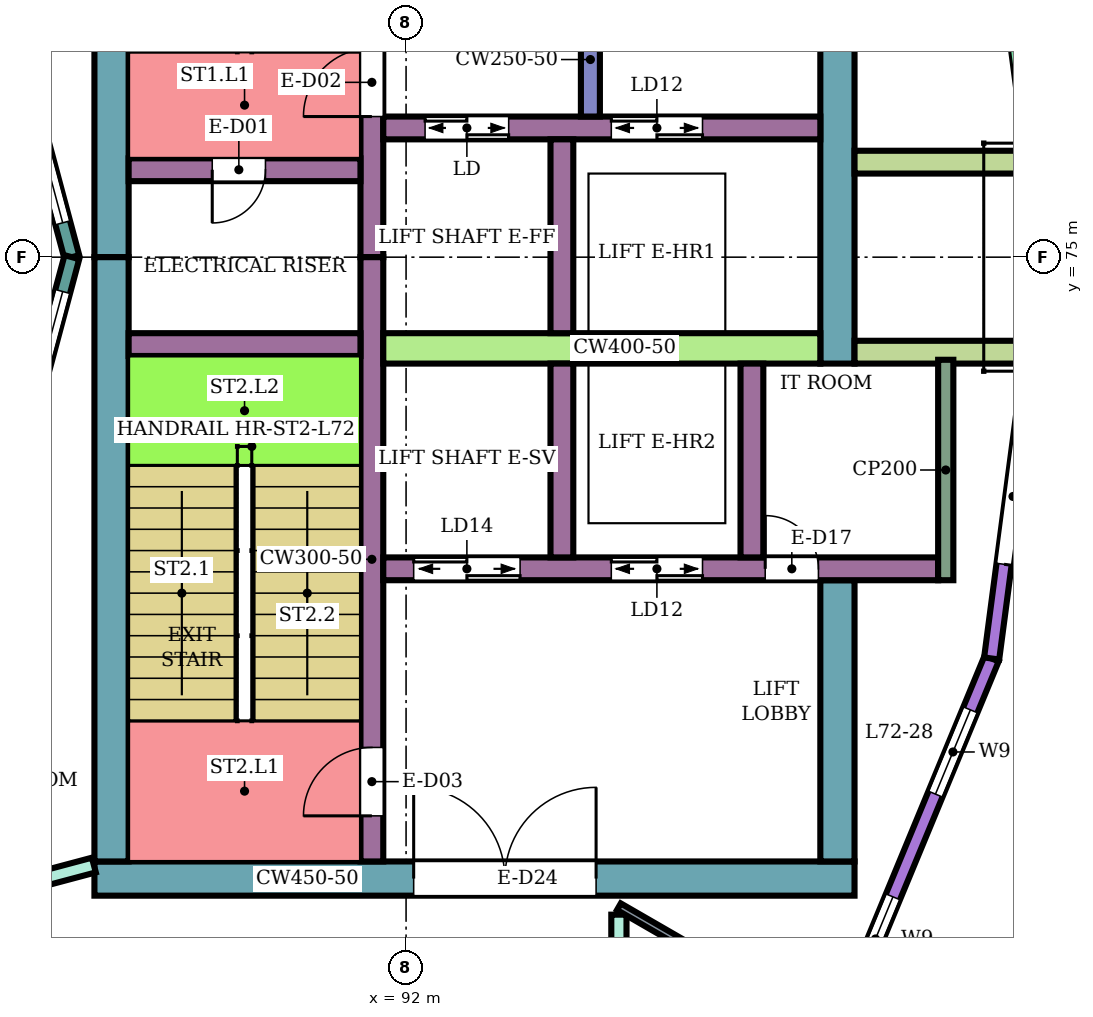
"""IFC4 building model, lengths in metres.
Left out: names, types, materials, properties, quantities, classifications, styles, units other than length and angle.
Written with IfcOpenShell. Run it as: python <this file> out.ifc"""

import sys

from ifc_helpers import new_model, si_unit, direction, frame, frame_2d, origin, place, context, subcontext, project, spatial, rectangle, extrude, element, fill, save


model = new_model("IFC4")
c1 = context("Model", 3, precision=1e-05, world=origin(), true_north=direction((0.0, 1.0)))
c2 = subcontext(c1, "Body", "Model", "MODEL_VIEW")
j1 = project(units=[si_unit("LENGTHUNIT", "METRE"), si_unit("PLANEANGLEUNIT", "RADIAN")], contexts=[c1])
p1 = place(None, origin())
s1 = spatial("IfcSite", under=j1, at=p1, CompositionType="ELEMENT")
p2 = place(p1, origin())
s2 = spatial("IfcBuilding", under=s1, at=p2, CompositionType="ELEMENT")
p3 = place(p2, frame((0.0, 0.0, 314.9)))
s3 = spatial("IfcBuildingStorey", under=s2, at=p3, CompositionType="ELEMENT", Elevation=314.9)
p4 = place(p3, frame((87.9, 66.825, 0.0), z_axis=(0.0, 0.0, 1.0), x_axis=(1.0, 0.0, 0.0)))
e1 = element("IfcWall", 1, at=p4, inside=s3, PredefinedType="SHEAR", context=c2, shape_type="SweptSolid", body=[
    extrude(rectangle(XDim=10.0, YDim=0.45, at=frame_2d((5.0, 0.0))), origin(), (0.0, 0.0, 1.0), 4.08),
])
p5 = place(p4, frame((4.2, 0.0, 0.0)))
e2 = element("IfcOpeningElement", 2, at=p5, cuts=e1, PredefinedType="OPENING", context=c2, shape_type="SweptSolid", body=[
    extrude(rectangle(XDim=2.4, YDim=2.4, at=frame_2d((1.2, 1.2))), frame((0.0, 0.235, 0.0), z_axis=(0.0, -1.0, 0.0), x_axis=(1.0, 0.0, 0.0)), (0.0, 0.0, 1.0), 0.47),
])
for number, where, z_axis, x_axis in (
    (3, (88.125, 75.0, 0.0), (0.0, 0.0, 1.0), (0.0, 1.0, 0.0)),
    (4, (88.125, 67.05, 0.0), (0.0, 0.0, 1.0), (0.0, 1.0, 0.0)),
):
    element("IfcWall", number, at=place(p3, frame(where, z_axis=z_axis, x_axis=x_axis)), inside=s3, PredefinedType="SHEAR", context=c2, shape_type="SweptSolid", body=[
        extrude(rectangle(XDim=7.95, YDim=0.45, at=frame_2d((3.975, 0.0))), origin(), (0.0, 0.0, 1.0), 4.08),
    ])
p6 = place(p3, frame((97.675, 73.6, 0.0), z_axis=(0.0, 0.0, 1.0), x_axis=(0.0, 1.0, 0.0)))
e5 = element("IfcWall", 5, at=p6, inside=s3, PredefinedType="SHEAR", context=c2, shape_type="SweptSolid", body=[
    extrude(rectangle(XDim=9.35, YDim=0.45, at=frame_2d((4.675, 0.0))), origin(), (0.0, 0.0, 1.0), 4.08),
])
p7 = place(p3, frame((97.675, 67.05, 0.0), z_axis=(0.0, 0.0, 1.0), x_axis=(0.0, 1.0, 0.0)))
e6 = element("IfcWall", 6, at=p7, inside=s3, PredefinedType="SHEAR", context=c2, shape_type="SweptSolid", body=[
    extrude(rectangle(XDim=3.7, YDim=0.45, at=frame_2d((1.85, 0.0))), origin(), (0.0, 0.0, 1.0), 4.08),
])
p8 = place(p3, frame((91.55, 75.0, 0.0), z_axis=(0.0, 0.0, 1.0), x_axis=(0.0, 1.0, 0.0)))
e7 = element("IfcWall", 7, at=p8, inside=s3, PredefinedType="SHEAR", context=c2, shape_type="SweptSolid", body=[
    extrude(rectangle(XDim=7.95, YDim=0.3, at=frame_2d((3.975, 0.0))), origin(), (0.0, 0.0, 1.0), 4.08),
])
p9 = place(p8, frame((1.85, 0.0, 0.0)))
e8 = element("IfcOpeningElement", 8, at=p9, cuts=e7, PredefinedType="OPENING", context=c2, shape_type="SweptSolid", body=[
    extrude(rectangle(XDim=0.9, YDim=2.1, at=frame_2d((0.45, 1.05))), frame((0.0, 0.16, 0.0), z_axis=(0.0, -1.0, 0.0), x_axis=(1.0, 0.0, 0.0)), (0.0, 0.0, 1.0), 0.32),
])
p10 = place(p3, frame((91.55, 67.05, 0.0), z_axis=(0.0, 0.0, 1.0), x_axis=(0.0, 1.0, 0.0)))
e9 = element("IfcWall", 9, at=p10, inside=s3, PredefinedType="SHEAR", context=c2, shape_type="SweptSolid", body=[
    extrude(rectangle(XDim=7.95, YDim=0.3, at=frame_2d((3.975, 0.0))), origin(), (0.0, 0.0, 1.0), 4.08),
])
p11 = place(p10, frame((0.6, 0.0, 0.0)))
e10 = element("IfcOpeningElement", 10, at=p11, cuts=e9, PredefinedType="OPENING", context=c2, shape_type="SweptSolid", body=[
    extrude(rectangle(XDim=0.9, YDim=2.1, at=frame_2d((0.45, 1.05))), frame((0.0, 0.16, 0.0), z_axis=(0.0, -1.0, 0.0), x_axis=(1.0, 0.0, 0.0)), (0.0, 0.0, 1.0), 0.32),
])
p12 = place(p3, frame((88.35, 76.15, 0.0), z_axis=(0.0, 0.0, 1.0), x_axis=(1.0, 0.0, 0.0)))
e11 = element("IfcWall", 11, at=p12, inside=s3, PredefinedType="SHEAR", context=c2, shape_type="SweptSolid", body=[
    extrude(rectangle(XDim=3.05, YDim=0.3, at=frame_2d((1.525, 0.0))), origin(), (0.0, 0.0, 1.0), 4.08),
])
p13 = place(p12, frame((1.1, 0.0, 0.0)))
e12 = element("IfcOpeningElement", 12, at=p13, cuts=e11, PredefinedType="OPENING", context=c2, shape_type="SweptSolid", body=[
    extrude(rectangle(XDim=0.7, YDim=2.0, at=frame_2d((0.35, 1.0))), frame((0.0, 0.16, 0.0), z_axis=(0.0, -1.0, 0.0), x_axis=(1.0, 0.0, 0.0)), (0.0, 0.0, 1.0), 0.32),
])
p14 = place(p3, frame((88.35, 73.85, 0.0), z_axis=(0.0, 0.0, 1.0), x_axis=(1.0, 0.0, 0.0)))
e13 = element("IfcWall", 13, at=p14, inside=s3, PredefinedType="SHEAR", context=c2, shape_type="SweptSolid", body=[
    extrude(rectangle(XDim=3.05, YDim=0.3, at=frame_2d((1.525, 0.0))), origin(), (0.0, 0.0, 1.0), 4.08),
])
p15 = place(p3, frame((91.7, 76.7, 0.0), z_axis=(0.0, 0.0, 1.0), x_axis=(1.0, 0.0, 0.0)))
e14 = element("IfcWall", 14, at=p15, inside=s3, PredefinedType="SHEAR", context=c2, shape_type="SweptSolid", body=[
    extrude(rectangle(XDim=5.75, YDim=0.3, at=frame_2d((2.875, 0.0))), origin(), (0.0, 0.0, 1.0), 4.08),
])
p16 = place(p15, frame((0.55, 0.0, 0.0)))
e15 = element("IfcOpeningElement", 15, at=p16, cuts=e14, PredefinedType="OPENING", context=c2, shape_type="SweptSolid", body=[
    extrude(rectangle(XDim=1.1, YDim=2.1, at=frame_2d((0.55, 1.05))), frame((0.0, 0.16, 0.0), z_axis=(0.0, -1.0, 0.0), x_axis=(1.0, 0.0, 0.0)), (0.0, 0.0, 1.0), 0.32),
])
p17 = place(p15, frame((3.0, 0.0, 0.0)))
e16 = element("IfcOpeningElement", 16, at=p17, cuts=e14, PredefinedType="OPENING", context=c2, shape_type="SweptSolid", body=[
    extrude(rectangle(XDim=1.2, YDim=2.1, at=frame_2d((0.6, 1.05))), frame((0.0, 0.16, 0.0), z_axis=(0.0, -1.0, 0.0), x_axis=(1.0, 0.0, 0.0)), (0.0, 0.0, 1.0), 0.32),
])
p18 = place(p3, frame((91.7, 73.8, 0.0), z_axis=(0.0, 0.0, 1.0), x_axis=(1.0, 0.0, 0.0)))
e17 = element("IfcWall", 17, at=p18, inside=s3, PredefinedType="SHEAR", context=c2, shape_type="SweptSolid", body=[
    extrude(rectangle(XDim=5.75, YDim=0.4, at=frame_2d((2.875, 0.0))), origin(), (0.0, 0.0, 1.0), 4.08),
])
p19 = place(p3, frame((91.7, 70.9, 0.0), z_axis=(0.0, 0.0, 1.0), x_axis=(1.0, 0.0, 0.0)))
e18 = element("IfcWall", 18, at=p19, inside=s3, PredefinedType="SHEAR", context=c2, shape_type="SweptSolid", body=[
    extrude(rectangle(XDim=7.3, YDim=0.3, at=frame_2d((3.65, 0.0))), origin(), (0.0, 0.0, 1.0), 4.08),
])
p20 = place(p19, frame((0.4, 0.0, 0.0)))
e19 = element("IfcOpeningElement", 19, at=p20, cuts=e18, PredefinedType="OPENING", context=c2, shape_type="SweptSolid", body=[
    extrude(rectangle(XDim=1.4, YDim=2.1, at=frame_2d((0.7, 1.05))), frame((0.0, 0.16, 0.0), z_axis=(0.0, -1.0, 0.0), x_axis=(1.0, 0.0, 0.0)), (0.0, 0.0, 1.0), 0.32),
])
p21 = place(p19, frame((3.0, 0.0, 0.0)))
e20 = element("IfcOpeningElement", 20, at=p21, cuts=e18, PredefinedType="OPENING", context=c2, shape_type="SweptSolid", body=[
    extrude(rectangle(XDim=1.2, YDim=2.1, at=frame_2d((0.6, 1.05))), frame((0.0, 0.16, 0.0), z_axis=(0.0, -1.0, 0.0), x_axis=(1.0, 0.0, 0.0)), (0.0, 0.0, 1.0), 0.32),
])
p22 = place(p19, frame((5.025, 0.0, 0.0)))
e21 = element("IfcOpeningElement", 21, at=p22, cuts=e18, PredefinedType="OPENING", context=c2, shape_type="SweptSolid", body=[
    extrude(rectangle(XDim=0.7, YDim=2.1, at=frame_2d((0.35, 1.05))), frame((0.0, 0.16, 0.0), z_axis=(0.0, -1.0, 0.0), x_axis=(1.0, 0.0, 0.0)), (0.0, 0.0, 1.0), 0.32),
])
for number, where, z_axis, x_axis in (
    (22, (94.05, 74.0, 0.0), (0.0, 0.0, 1.0), (0.0, 1.0, 0.0)),
    (23, (94.05, 71.05, 0.0), (0.0, 0.0, 1.0), (0.0, 1.0, 0.0)),
    (24, (96.55, 71.05, 0.0), (0.0, 0.0, 1.0), (0.0, 1.0, 0.0)),
):
    element("IfcWall", number, at=place(p3, frame(where, z_axis=z_axis, x_axis=x_axis)), inside=s3, PredefinedType="SHEAR", context=c2, shape_type="SweptSolid", body=[
        extrude(rectangle(XDim=2.55, YDim=0.3, at=frame_2d((1.275, 0.0))), origin(), (0.0, 0.0, 1.0), 4.08),
    ])
p23 = place(p3, frame((94.425, 76.85, 0.0), z_axis=(0.0, 0.0, 1.0), x_axis=(0.0, 1.0, 0.0)))
e25 = element("IfcWall", 25, at=p23, inside=s3, PredefinedType="SHEAR", context=c2, shape_type="SweptSolid", body=[
    extrude(rectangle(XDim=1.5, YDim=0.25, at=frame_2d((0.75, 0.0))), origin(), (0.0, 0.0, 1.0), 4.08),
])
p24 = place(p3, frame((97.666, 64.801, 0.0), z_axis=(0.0, 0.0, 1.0), x_axis=(0.382690574388, 0.923876574156, 0.0)))
e26 = element("IfcWall", 26, at=p24, inside=s3, PredefinedType="NOTDEFINED", context=c2, shape_type="SweptSolid", body=[
    extrude(rectangle(XDim=5.325, YDim=0.2, at=frame_2d((2.663, 0.0))), origin(), (0.0, 0.0, 1.0), 4.4),
])
p25 = place(p24, frame((0.731, 0.0, 0.9)))
e27 = element("IfcOpeningElement", 27, at=p25, cuts=e26, PredefinedType="OPENING", context=c2, shape_type="SweptSolid", body=[
    extrude(rectangle(XDim=1.2, YDim=2.7, at=frame_2d((0.6, 1.35))), frame((0.0, 0.11, 0.0), z_axis=(0.0, -1.0, 0.0), x_axis=(1.0, 0.0, 0.0)), (0.0, 0.0, 1.0), 0.22),
])
p26 = place(p24, frame((3.394, 0.0, 0.9)))
e28 = element("IfcOpeningElement", 28, at=p26, cuts=e26, PredefinedType="OPENING", context=c2, shape_type="SweptSolid", body=[
    extrude(rectangle(XDim=1.2, YDim=2.7, at=frame_2d((0.6, 1.35))), frame((0.0, 0.11, 0.0), z_axis=(0.0, -1.0, 0.0), x_axis=(1.0, 0.0, 0.0)), (0.0, 0.0, 1.0), 0.22),
])
p27 = place(p3, frame((99.704, 69.72, 0.0), z_axis=(0.0, 0.0, 1.0), x_axis=(0.130512609533, 0.991446649474, 0.0)))
e29 = element("IfcWall", 29, at=p27, inside=s3, PredefinedType="NOTDEFINED", context=c2, shape_type="SweptSolid", body=[
    extrude(rectangle(XDim=3.913, YDim=0.2, at=frame_2d((1.957, 0.0))), origin(), (0.0, 0.0, 1.0), 4.4),
])
p28 = place(p27, frame((1.25, 0.0, 0.0)))
e30 = element("IfcOpeningElement", 30, at=p28, cuts=e29, PredefinedType="OPENING", context=c2, shape_type="SweptSolid", body=[
    extrude(rectangle(XDim=1.8, YDim=2.7, at=frame_2d((0.9, 1.35))), frame((0.0, 0.11, 0.0), z_axis=(0.0, -1.0, 0.0), x_axis=(1.0, 0.0, 0.0)), (0.0, 0.0, 1.0), 0.22),
])
for number, where, z_axis, x_axis in (
    (31, (97.9, 73.75, 0.0), (0.0, 0.0, 1.0), (1.0, 0.0, 0.0)),
    (32, (97.9, 76.25, 0.0), (0.0, 0.0, 1.0), (1.0, 0.0, 0.0)),
):
    element("IfcWall", number, at=place(p3, frame(where, z_axis=z_axis, x_axis=x_axis)), inside=s3, PredefinedType="NOTDEFINED", context=c2, shape_type="SweptSolid", body=[
        extrude(rectangle(XDim=2.416, YDim=0.3, at=frame_2d((1.208, 0.0))), origin(), (0.0, 0.0, 1.0), 4.4),
    ])
p29 = place(p3, frame((87.604, 75.0, 0.0), z_axis=(0.0, 0.0, 1.0), x_axis=(-0.258789828301, 0.965933654434, 0.0)))
e33 = element("IfcWall", 33, at=p29, inside=s3, PredefinedType="NOTDEFINED", context=c2, shape_type="SweptSolid", body=[
    extrude(rectangle(XDim=3.936, YDim=0.2, at=frame_2d((1.968, 0.0))), origin(), (0.0, 0.0, 1.0), 4.4),
])
p30 = place(p29, frame((0.468, 0.0, 0.9)))
e34 = element("IfcOpeningElement", 34, at=p30, cuts=e33, PredefinedType="OPENING", context=c2, shape_type="SweptSolid", body=[
    extrude(rectangle(XDim=3.0, YDim=2.3, at=frame_2d((1.5, 1.15))), frame((0.0, 0.11, 0.0), z_axis=(0.0, -1.0, 0.0), x_axis=(1.0, 0.0, 0.0)), (0.0, 0.0, 1.0), 0.22),
])
p31 = place(p3, frame((86.585, 71.198, 0.0), z_axis=(0.0, 0.0, 1.0), x_axis=(0.258789828301, 0.965933654434, 0.0)))
e35 = element("IfcWall", 35, at=p31, inside=s3, PredefinedType="NOTDEFINED", context=c2, shape_type="SweptSolid", body=[
    extrude(rectangle(XDim=3.936, YDim=0.2, at=frame_2d((1.968, 0.0))), origin(), (0.0, 0.0, 1.0), 4.4),
])
p32 = place(p31, frame((0.468, 0.0, 0.9)))
e36 = element("IfcOpeningElement", 36, at=p32, cuts=e35, PredefinedType="OPENING", context=c2, shape_type="SweptSolid", body=[
    extrude(rectangle(XDim=3.0, YDim=2.3, at=frame_2d((1.5, 1.15))), frame((0.0, 0.11, 0.0), z_axis=(0.0, -1.0, 0.0), x_axis=(1.0, 0.0, 0.0)), (0.0, 0.0, 1.0), 0.22),
])
p33 = place(p3, frame((80.125, 64.932, 0.0), z_axis=(0.0, 0.0, 1.0), x_axis=(0.966236955806, 0.257655089674, 0.0)))
e37 = element("IfcWall", 37, at=p33, inside=s3, PredefinedType="PARTITIONING", context=c2, shape_type="SweptSolid", body=[
    extrude(rectangle(XDim=8.039, YDim=0.2, at=frame_2d((4.02, 0.0))), origin(), (0.0, 0.0, 1.0), 3.95),
])
p34 = place(p33, frame((6.298, 0.0, 0.0)))
e38 = element("IfcOpeningElement", 38, at=p34, cuts=e37, PredefinedType="OPENING", context=c2, shape_type="SweptSolid", body=[
    extrude(rectangle(XDim=0.9, YDim=2.1, at=frame_2d((0.45, 1.05))), frame((0.0, 0.11, 0.0), z_axis=(0.0, -1.0, 0.0), x_axis=(1.0, 0.0, 0.0)), (0.0, 0.0, 1.0), 0.22),
])
p35 = place(p33, frame((2.045, 0.0, 0.0)))
e39 = element("IfcOpeningElement", 39, at=p35, cuts=e37, PredefinedType="OPENING", context=c2, shape_type="SweptSolid", body=[
    extrude(rectangle(XDim=0.9, YDim=2.1, at=frame_2d((0.45, 1.05))), frame((0.0, 0.11, 0.0), z_axis=(0.0, -1.0, 0.0), x_axis=(1.0, 0.0, 0.0)), (0.0, 0.0, 1.0), 0.22),
])
p36 = place(p3, frame((94.8, 65.1, 0.0), z_axis=(0.0, 0.0, 1.0), x_axis=(0.0, 1.0, 0.0)))
e40 = element("IfcWall", 40, at=p36, inside=s3, PredefinedType="PARTITIONING", context=c2, shape_type="SweptSolid", body=[
    extrude(rectangle(XDim=1.25, YDim=0.2, at=frame_2d((0.625, 0.0))), origin(), (0.0, 0.0, 1.0), 3.95),
])
p37 = place(p3, frame((94.8, 66.455, 0.0), z_axis=(0.0, 0.0, 1.0), x_axis=(0.866056279496, -0.499946517884, 0.0)))
e41 = element("IfcWall", 41, at=p37, inside=s3, PredefinedType="PARTITIONING", context=c2, shape_type="SweptSolid", body=[
    extrude(rectangle(XDim=3.207, YDim=0.1, at=frame_2d((1.604, 0.0))), origin(), (0.0, 0.0, 1.0), 3.95),
])
p38 = place(p37, frame((2.007, 0.0, 0.0)))
e42 = element("IfcOpeningElement", 42, at=p38, cuts=e41, PredefinedType="OPENING", context=c2, shape_type="SweptSolid", body=[
    extrude(rectangle(XDim=0.9, YDim=2.1, at=frame_2d((0.45, 1.05))), frame((0.0, 0.06, 0.0), z_axis=(0.0, -1.0, 0.0), x_axis=(1.0, 0.0, 0.0)), (0.0, 0.0, 1.0), 0.12),
])
p39 = place(p3, frame((99.1, 70.75, 0.0), z_axis=(0.0, 0.0, 1.0), x_axis=(0.0, 1.0, 0.0)))
e43 = element("IfcWall", 43, at=p39, inside=s3, PredefinedType="PARTITIONING", context=c2, shape_type="SweptSolid", body=[
    extrude(rectangle(XDim=2.9, YDim=0.2, at=frame_2d((1.45, 0.0))), origin(), (0.0, 0.0, 1.0), 4.08),
])
p40 = place(p25, origin())
e44 = element("IfcWindow", 44, at=p40, inside=s3, PartitioningType="SINGLE_PANEL", PredefinedType="WINDOW", context=c2, shape_type="SweptSolid", body=[
    extrude(rectangle(XDim=1.2, YDim=2.7, at=frame_2d((0.6, 1.35))), frame((0.0, 0.03, 0.0), z_axis=(0.0, -1.0, 0.0), x_axis=(1.0, 0.0, 0.0)), (0.0, 0.0, 1.0), 0.06),
])
fill(e27, e44)
p41 = place(p26, origin())
e45 = element("IfcWindow", 45, at=p41, inside=s3, PartitioningType="SINGLE_PANEL", PredefinedType="WINDOW", context=c2, shape_type="SweptSolid", body=[
    extrude(rectangle(XDim=1.2, YDim=2.7, at=frame_2d((0.6, 1.35))), frame((0.0, 0.03, 0.0), z_axis=(0.0, -1.0, 0.0), x_axis=(1.0, 0.0, 0.0)), (0.0, 0.0, 1.0), 0.06),
])
fill(e28, e45)
p42 = place(p28, frame((1.8, 0.0, 0.0), z_axis=(0.0, 0.0, 1.0), x_axis=(-1.0, 0.0, 0.0)))
e46 = element("IfcDoor", 46, at=p42, inside=s3, OperationType="DOUBLE_DOOR_SINGLE_SWING", PredefinedType="DOOR", context=c2, shape_type="SweptSolid", body=[
    extrude(rectangle(XDim=1.8, YDim=2.7, at=frame_2d((0.9, 1.35))), frame((0.0, 0.025, 0.0), z_axis=(0.0, -1.0, 0.0), x_axis=(1.0, 0.0, 0.0)), (0.0, 0.0, 1.0), 0.05),
])
fill(e30, e46)
p43 = place(p30, origin())
e47 = element("IfcWindow", 47, at=p43, inside=s3, PartitioningType="SINGLE_PANEL", PredefinedType="WINDOW", context=c2, shape_type="SweptSolid", body=[
    extrude(rectangle(XDim=3.0, YDim=2.3, at=frame_2d((1.5, 1.15))), frame((0.0, 0.03, 0.0), z_axis=(0.0, -1.0, 0.0), x_axis=(1.0, 0.0, 0.0)), (0.0, 0.0, 1.0), 0.06),
])
fill(e34, e47)
p44 = place(p32, origin())
e48 = element("IfcWindow", 48, at=p44, inside=s3, PartitioningType="SINGLE_PANEL", PredefinedType="WINDOW", context=c2, shape_type="SweptSolid", body=[
    extrude(rectangle(XDim=3.0, YDim=2.3, at=frame_2d((1.5, 1.15))), frame((0.0, 0.03, 0.0), z_axis=(0.0, -1.0, 0.0), x_axis=(1.0, 0.0, 0.0)), (0.0, 0.0, 1.0), 0.06),
])
fill(e36, e48)
p45 = place(p13, frame((0.7, 0.0, 0.0), z_axis=(0.0, 0.0, 1.0), x_axis=(-1.0, 0.0, 0.0)))
e49 = element("IfcDoor", 49, at=p45, inside=s3, OperationType="SINGLE_SWING_RIGHT", PredefinedType="DOOR", context=c2, shape_type="SweptSolid", body=[
    extrude(rectangle(XDim=0.7, YDim=2.0, at=frame_2d((0.35, 1.0))), frame((0.0, 0.025, 0.0), z_axis=(0.0, -1.0, 0.0), x_axis=(1.0, 0.0, 0.0)), (0.0, 0.0, 1.0), 0.05),
])
fill(e12, e49)
p46 = place(p9, origin())
e50 = element("IfcDoor", 50, at=p46, inside=s3, OperationType="SINGLE_SWING_LEFT", PredefinedType="DOOR", context=c2, shape_type="SweptSolid", body=[
    extrude(rectangle(XDim=0.9, YDim=2.1, at=frame_2d((0.45, 1.05))), frame((0.0, 0.025, 0.0), z_axis=(0.0, -1.0, 0.0), x_axis=(1.0, 0.0, 0.0)), (0.0, 0.0, 1.0), 0.05),
])
fill(e8, e50)
p47 = place(p11, origin())
e51 = element("IfcDoor", 51, at=p47, inside=s3, OperationType="SINGLE_SWING_LEFT", PredefinedType="DOOR", context=c2, shape_type="SweptSolid", body=[
    extrude(rectangle(XDim=0.9, YDim=2.1, at=frame_2d((0.45, 1.05))), frame((0.0, 0.025, 0.0), z_axis=(0.0, -1.0, 0.0), x_axis=(1.0, 0.0, 0.0)), (0.0, 0.0, 1.0), 0.05),
])
fill(e10, e51)
p48 = place(p16, origin())
e52 = element("IfcDoor", 52, at=p48, inside=s3, OperationType="DOUBLE_DOOR_SLIDING", PredefinedType="DOOR", context=c2, shape_type="SweptSolid", body=[
    extrude(rectangle(XDim=1.1, YDim=2.1, at=frame_2d((0.55, 1.05))), frame((0.0, 0.025, 0.0), z_axis=(0.0, -1.0, 0.0), x_axis=(1.0, 0.0, 0.0)), (0.0, 0.0, 1.0), 0.05),
])
fill(e15, e52)
p49 = place(p17, origin())
e53 = element("IfcDoor", 53, at=p49, inside=s3, OperationType="DOUBLE_DOOR_SLIDING", PredefinedType="DOOR", context=c2, shape_type="SweptSolid", body=[
    extrude(rectangle(XDim=1.2, YDim=2.1, at=frame_2d((0.6, 1.05))), frame((0.0, 0.025, 0.0), z_axis=(0.0, -1.0, 0.0), x_axis=(1.0, 0.0, 0.0)), (0.0, 0.0, 1.0), 0.05),
])
fill(e16, e53)
p50 = place(p20, origin())
e54 = element("IfcDoor", 54, at=p50, inside=s3, OperationType="DOUBLE_DOOR_SLIDING", PredefinedType="DOOR", context=c2, shape_type="SweptSolid", body=[
    extrude(rectangle(XDim=1.4, YDim=2.1, at=frame_2d((0.7, 1.05))), frame((0.0, 0.025, 0.0), z_axis=(0.0, -1.0, 0.0), x_axis=(1.0, 0.0, 0.0)), (0.0, 0.0, 1.0), 0.05),
])
fill(e19, e54)
p51 = place(p21, origin())
e55 = element("IfcDoor", 55, at=p51, inside=s3, OperationType="DOUBLE_DOOR_SLIDING", PredefinedType="DOOR", context=c2, shape_type="SweptSolid", body=[
    extrude(rectangle(XDim=1.2, YDim=2.1, at=frame_2d((0.6, 1.05))), frame((0.0, 0.025, 0.0), z_axis=(0.0, -1.0, 0.0), x_axis=(1.0, 0.0, 0.0)), (0.0, 0.0, 1.0), 0.05),
])
fill(e20, e55)
p52 = place(p22, origin())
e56 = element("IfcDoor", 56, at=p52, inside=s3, OperationType="SINGLE_SWING_LEFT", PredefinedType="DOOR", context=c2, shape_type="SweptSolid", body=[
    extrude(rectangle(XDim=0.7, YDim=2.1, at=frame_2d((0.35, 1.05))), frame((0.0, 0.025, 0.0), z_axis=(0.0, -1.0, 0.0), x_axis=(1.0, 0.0, 0.0)), (0.0, 0.0, 1.0), 0.05),
])
fill(e21, e56)
p53 = place(p5, origin())
e57 = element("IfcDoor", 57, at=p53, inside=s3, OperationType="DOUBLE_DOOR_SINGLE_SWING", PredefinedType="DOOR", context=c2, shape_type="SweptSolid", body=[
    extrude(rectangle(XDim=2.4, YDim=2.4, at=frame_2d((1.2, 1.2))), frame((0.0, 0.025, 0.0), z_axis=(0.0, -1.0, 0.0), x_axis=(1.0, 0.0, 0.0)), (0.0, 0.0, 1.0), 0.05),
])
fill(e2, e57)
save(model, sys.argv[1])
